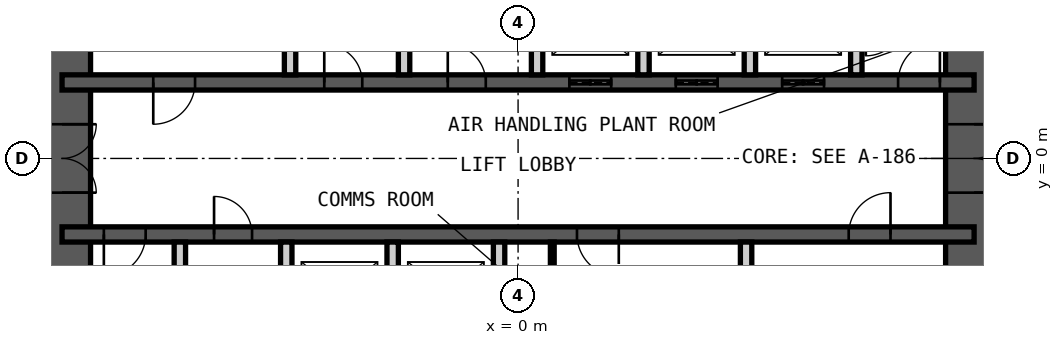
"""IFC4 building model, lengths in metres.
Left out: names, types, materials, properties, quantities, classifications, styles, units other than length and angle.
Written with IfcOpenShell. Run it as: python <this file> out.ifc"""

import sys

from ifc_helpers import new_model, si_unit, direction, frame, frame_2d, origin, place, context, subcontext, project, spatial, rectangle, extrude, element, fill, save


model = new_model("IFC4")
c1 = context("Model", 3, precision=1e-05, world=origin(), true_north=direction((0.0, 1.0)))
c2 = subcontext(c1, "Body", "Model", "MODEL_VIEW")
j1 = project(units=[si_unit("LENGTHUNIT", "METRE"), si_unit("PLANEANGLEUNIT", "RADIAN")], contexts=[c1])
p1 = place(None, origin())
s1 = spatial("IfcSite", under=j1, at=p1, CompositionType="ELEMENT")
p2 = place(p1, origin())
s2 = spatial("IfcBuilding", under=s1, at=p2, CompositionType="ELEMENT")
p3 = place(p2, frame((0.0, 0.0, 170.2)))
s3 = spatial("IfcBuildingStorey", under=s2, at=p3, CompositionType="ELEMENT", Elevation=170.2)
p4 = place(p3, frame((12.0, -9.0, 0.0), z_axis=(0.0, 0.0, 1.0), x_axis=(0.0, 1.0, 0.0)))
e1 = element("IfcWall", 1, at=p4, inside=s3, PredefinedType="SHEAR", context=c2, shape_type="SweptSolid", body=[
    extrude(rectangle(XDim=18.0, YDim=1.5, at=frame_2d((9.0, 0.0))), origin(), (0.0, 0.0, 1.0), 4.2),
])
p5 = place(p4, frame((8.1, 0.0, 0.0)))
e2 = element("IfcOpeningElement", 2, at=p5, cuts=e1, PredefinedType="OPENING", context=c2, shape_type="SweptSolid", body=[
    extrude(rectangle(XDim=1.8, YDim=2.1, at=frame_2d((0.9, 1.05))), frame((0.0, 0.76, 0.0), z_axis=(0.0, -1.0, 0.0), x_axis=(1.0, 0.0, 0.0)), (0.0, 0.0, 1.0), 1.52),
])
p6 = place(p3, frame((-12.0, -9.0, 0.0), z_axis=(0.0, 0.0, 1.0), x_axis=(0.0, 1.0, 0.0)))
e3 = element("IfcWall", 3, at=p6, inside=s3, PredefinedType="SHEAR", context=c2, shape_type="SweptSolid", body=[
    extrude(rectangle(XDim=18.0, YDim=1.5, at=frame_2d((9.0, 0.0))), origin(), (0.0, 0.0, 1.0), 4.2),
])
p7 = place(p6, frame((8.1, 0.0, 0.0)))
e4 = element("IfcOpeningElement", 4, at=p7, cuts=e3, PredefinedType="OPENING", context=c2, shape_type="SweptSolid", body=[
    extrude(rectangle(XDim=1.8, YDim=2.1, at=frame_2d((0.9, 1.05))), frame((0.0, 0.76, 0.0), z_axis=(0.0, -1.0, 0.0), x_axis=(1.0, 0.0, 0.0)), (0.0, 0.0, 1.0), 1.52),
])
p8 = place(p3, frame((-12.0, 2.0, 0.0), z_axis=(0.0, 0.0, 1.0), x_axis=(1.0, 0.0, 0.0)))
e5 = element("IfcWall", 5, at=p8, inside=s3, PredefinedType="SHEAR", context=c2, shape_type="SweptSolid", body=[
    extrude(rectangle(XDim=24.0, YDim=0.4, at=frame_2d((12.0, 0.0))), origin(), (0.0, 0.0, 1.0), 4.2),
])
p9 = place(p8, frame((2.4, 0.0, 0.0)))
e6 = element("IfcOpeningElement", 6, at=p9, cuts=e5, PredefinedType="OPENING", context=c2, shape_type="SweptSolid", body=[
    extrude(rectangle(XDim=1.1, YDim=2.1, at=frame_2d((0.55, 1.05))), frame((0.0, 0.21, 0.0), z_axis=(0.0, -1.0, 0.0), x_axis=(1.0, 0.0, 0.0)), (0.0, 0.0, 1.0), 0.42),
])
p10 = place(p8, frame((22.0, 0.0, 0.0)))
e7 = element("IfcOpeningElement", 7, at=p10, cuts=e5, PredefinedType="OPENING", context=c2, shape_type="SweptSolid", body=[
    extrude(rectangle(XDim=1.1, YDim=2.1, at=frame_2d((0.55, 1.05))), frame((0.0, 0.21, 0.0), z_axis=(0.0, -1.0, 0.0), x_axis=(1.0, 0.0, 0.0)), (0.0, 0.0, 1.0), 0.42),
])
p11 = place(p8, frame((10.15, 0.0, 0.0)))
e8 = element("IfcOpeningElement", 8, at=p11, cuts=e5, PredefinedType="OPENING", context=c2, shape_type="SweptSolid", body=[
    extrude(rectangle(XDim=1.0, YDim=2.1, at=frame_2d((0.5, 1.05))), frame((0.0, 0.21, 0.0), z_axis=(0.0, -1.0, 0.0), x_axis=(1.0, 0.0, 0.0)), (0.0, 0.0, 1.0), 0.42),
])
p12 = place(p8, frame((6.9, 0.0, 0.0)))
e9 = element("IfcOpeningElement", 9, at=p12, cuts=e5, PredefinedType="OPENING", context=c2, shape_type="SweptSolid", body=[
    extrude(rectangle(XDim=1.0, YDim=2.1, at=frame_2d((0.5, 1.05))), frame((0.0, 0.21, 0.0), z_axis=(0.0, -1.0, 0.0), x_axis=(1.0, 0.0, 0.0)), (0.0, 0.0, 1.0), 0.42),
])
p13 = place(p8, frame((13.35, 0.0, 0.0)))
e10 = element("IfcOpeningElement", 10, at=p13, cuts=e5, PredefinedType="OPENING", context=c2, shape_type="SweptSolid", body=[
    extrude(rectangle(XDim=1.1, YDim=2.4, at=frame_2d((0.55, 1.2))), frame((0.0, 0.21, 0.0), z_axis=(0.0, -1.0, 0.0), x_axis=(1.0, 0.0, 0.0)), (0.0, 0.0, 1.0), 0.42),
])
p14 = place(p8, frame((16.15, 0.0, 0.0)))
e11 = element("IfcOpeningElement", 11, at=p14, cuts=e5, PredefinedType="OPENING", context=c2, shape_type="SweptSolid", body=[
    extrude(rectangle(XDim=1.1, YDim=2.4, at=frame_2d((0.55, 1.2))), frame((0.0, 0.21, 0.0), z_axis=(0.0, -1.0, 0.0), x_axis=(1.0, 0.0, 0.0)), (0.0, 0.0, 1.0), 0.42),
])
p15 = place(p8, frame((18.95, 0.0, 0.0)))
e12 = element("IfcOpeningElement", 12, at=p15, cuts=e5, PredefinedType="OPENING", context=c2, shape_type="SweptSolid", body=[
    extrude(rectangle(XDim=1.1, YDim=2.4, at=frame_2d((0.55, 1.2))), frame((0.0, 0.21, 0.0), z_axis=(0.0, -1.0, 0.0), x_axis=(1.0, 0.0, 0.0)), (0.0, 0.0, 1.0), 0.42),
])
p16 = place(p3, frame((-12.0, -2.0, 0.0), z_axis=(0.0, 0.0, 1.0), x_axis=(1.0, 0.0, 0.0)))
e13 = element("IfcWall", 13, at=p16, inside=s3, PredefinedType="SHEAR", context=c2, shape_type="SweptSolid", body=[
    extrude(rectangle(XDim=24.0, YDim=0.4, at=frame_2d((12.0, 0.0))), origin(), (0.0, 0.0, 1.0), 4.2),
])
p17 = place(p16, frame((1.1, 0.0, 0.0)))
e14 = element("IfcOpeningElement", 14, at=p17, cuts=e13, PredefinedType="OPENING", context=c2, shape_type="SweptSolid", body=[
    extrude(rectangle(XDim=1.1, YDim=2.1, at=frame_2d((0.55, 1.05))), frame((0.0, 0.21, 0.0), z_axis=(0.0, -1.0, 0.0), x_axis=(1.0, 0.0, 0.0)), (0.0, 0.0, 1.0), 0.42),
])
p18 = place(p16, frame((13.55, 0.0, 0.0)))
e15 = element("IfcOpeningElement", 15, at=p18, cuts=e13, PredefinedType="OPENING", context=c2, shape_type="SweptSolid", body=[
    extrude(rectangle(XDim=1.1, YDim=2.1, at=frame_2d((0.55, 1.05))), frame((0.0, 0.21, 0.0), z_axis=(0.0, -1.0, 0.0), x_axis=(1.0, 0.0, 0.0)), (0.0, 0.0, 1.0), 0.42),
])
p19 = place(p16, frame((20.7, 0.0, 0.0)))
e16 = element("IfcOpeningElement", 16, at=p19, cuts=e13, PredefinedType="OPENING", context=c2, shape_type="SweptSolid", body=[
    extrude(rectangle(XDim=1.1, YDim=2.1, at=frame_2d((0.55, 1.05))), frame((0.0, 0.21, 0.0), z_axis=(0.0, -1.0, 0.0), x_axis=(1.0, 0.0, 0.0)), (0.0, 0.0, 1.0), 0.42),
])
p20 = place(p16, frame((4.0, 0.0, 0.0)))
e17 = element("IfcOpeningElement", 17, at=p20, cuts=e13, PredefinedType="OPENING", context=c2, shape_type="SweptSolid", body=[
    extrude(rectangle(XDim=1.0, YDim=2.1, at=frame_2d((0.5, 1.05))), frame((0.0, 0.21, 0.0), z_axis=(0.0, -1.0, 0.0), x_axis=(1.0, 0.0, 0.0)), (0.0, 0.0, 1.0), 0.42),
])
for number, where, z_axis, x_axis in (
    (18, (-6.0, 2.2, 0.0), (0.0, 0.0, 1.0), (0.0, 1.0, 0.0)),
    (19, (-3.0, 2.2, 0.0), (0.0, 0.0, 1.0), (0.0, 1.0, 0.0)),
    (20, (0.5, 2.2, 0.0), (0.0, 0.0, 1.0), (0.0, 1.0, 0.0)),
    (21, (3.3, 2.2, 0.0), (0.0, 0.0, 1.0), (0.0, 1.0, 0.0)),
    (22, (6.1, 2.2, 0.0), (0.0, 0.0, 1.0), (0.0, 1.0, 0.0)),
    (23, (8.9, 2.2, 0.0), (0.0, 0.0, 1.0), (0.0, 1.0, 0.0)),
    (24, (-8.9, -4.85, 0.0), (0.0, 0.0, 1.0), (0.0, 1.0, 0.0)),
    (25, (-6.1, -4.85, 0.0), (0.0, 0.0, 1.0), (0.0, 1.0, 0.0)),
    (26, (-3.3, -4.85, 0.0), (0.0, 0.0, 1.0), (0.0, 1.0, 0.0)),
    (27, (-0.5, -4.85, 0.0), (0.0, 0.0, 1.0), (0.0, 1.0, 0.0)),
    (28, (6.0, -4.85, 0.0), (0.0, 0.0, 1.0), (0.0, 1.0, 0.0)),
):
    element("IfcWall", number, at=place(p3, frame(where, z_axis=z_axis, x_axis=x_axis)), inside=s3, PredefinedType="PARTITIONING", context=c2, shape_type="SweptSolid", body=[
        extrude(rectangle(XDim=2.65, YDim=0.3, at=frame_2d((1.325, 0.0))), origin(), (0.0, 0.0, 1.0), 3.98),
    ])
p21 = place(p3, frame((0.9, -4.85, 0.0), z_axis=(0.0, 0.0, 1.0), x_axis=(0.0, 1.0, 0.0)))
e29 = element("IfcWall", 29, at=p21, inside=s3, PredefinedType="PARTITIONING", context=c2, shape_type="SweptSolid", body=[
    extrude(rectangle(XDim=2.65, YDim=0.1, at=frame_2d((1.325, 0.0))), origin(), (0.0, 0.0, 1.0), 3.98),
])
p22 = place(p21, frame((0.1, 0.0, 0.0)))
e30 = element("IfcOpeningElement", 30, at=p22, cuts=e29, PredefinedType="OPENING", context=c2, shape_type="SweptSolid", body=[
    extrude(rectangle(XDim=1.0, YDim=2.4, at=frame_2d((0.5, 1.2))), frame((0.0, 0.06, 0.0), z_axis=(0.0, -1.0, 0.0), x_axis=(1.0, 0.0, 0.0)), (0.0, 0.0, 1.0), 0.12),
])
p23 = place(p9, origin())
e31 = element("IfcDoor", 31, at=p23, inside=s3, OperationType="SINGLE_SWING_LEFT", PredefinedType="DOOR", context=c2, shape_type="SweptSolid", body=[
    extrude(rectangle(XDim=1.1, YDim=2.1, at=frame_2d((0.55, 1.05))), frame((0.0, 0.025, 0.0), z_axis=(0.0, -1.0, 0.0), x_axis=(1.0, 0.0, 0.0)), (0.0, 0.0, 1.0), 0.05),
])
fill(e6, e31)
p24 = place(p17, origin())
e32 = element("IfcDoor", 32, at=p24, inside=s3, OperationType="SINGLE_SWING_LEFT", PredefinedType="DOOR", context=c2, shape_type="SweptSolid", body=[
    extrude(rectangle(XDim=1.1, YDim=2.1, at=frame_2d((0.55, 1.05))), frame((0.0, 0.025, 0.0), z_axis=(0.0, -1.0, 0.0), x_axis=(1.0, 0.0, 0.0)), (0.0, 0.0, 1.0), 0.05),
])
fill(e14, e32)
p25 = place(p10, origin())
e33 = element("IfcDoor", 33, at=p25, inside=s3, OperationType="SINGLE_SWING_LEFT", PredefinedType="DOOR", context=c2, shape_type="SweptSolid", body=[
    extrude(rectangle(XDim=1.1, YDim=2.1, at=frame_2d((0.55, 1.05))), frame((0.0, 0.025, 0.0), z_axis=(0.0, -1.0, 0.0), x_axis=(1.0, 0.0, 0.0)), (0.0, 0.0, 1.0), 0.05),
])
fill(e7, e33)
p26 = place(p11, origin())
e34 = element("IfcDoor", 34, at=p26, inside=s3, OperationType="SINGLE_SWING_RIGHT", PredefinedType="DOOR", context=c2, shape_type="SweptSolid", body=[
    extrude(rectangle(XDim=1.0, YDim=2.1, at=frame_2d((0.5, 1.05))), frame((0.0, 0.025, 0.0), z_axis=(0.0, -1.0, 0.0), x_axis=(1.0, 0.0, 0.0)), (0.0, 0.0, 1.0), 0.05),
])
fill(e8, e34)
p27 = place(p18, origin())
e35 = element("IfcDoor", 35, at=p27, inside=s3, OperationType="SINGLE_SWING_RIGHT", PredefinedType="DOOR", context=c2, shape_type="SweptSolid", body=[
    extrude(rectangle(XDim=1.1, YDim=2.1, at=frame_2d((0.55, 1.05))), frame((0.0, 0.025, 0.0), z_axis=(0.0, -1.0, 0.0), x_axis=(1.0, 0.0, 0.0)), (0.0, 0.0, 1.0), 0.05),
])
fill(e15, e35)
p28 = place(p19, origin())
e36 = element("IfcDoor", 36, at=p28, inside=s3, OperationType="SINGLE_SWING_LEFT", PredefinedType="DOOR", context=c2, shape_type="SweptSolid", body=[
    extrude(rectangle(XDim=1.1, YDim=2.1, at=frame_2d((0.55, 1.05))), frame((0.0, 0.025, 0.0), z_axis=(0.0, -1.0, 0.0), x_axis=(1.0, 0.0, 0.0)), (0.0, 0.0, 1.0), 0.05),
])
fill(e16, e36)
p29 = place(p5, origin())
e37 = element("IfcDoor", 37, at=p29, inside=s3, OperationType="DOUBLE_DOOR_DOUBLE_SWING", PredefinedType="DOOR", context=c2, shape_type="SweptSolid", body=[
    extrude(rectangle(XDim=1.8, YDim=2.1, at=frame_2d((0.9, 1.05))), frame((0.0, 0.025, 0.0), z_axis=(0.0, -1.0, 0.0), x_axis=(1.0, 0.0, 0.0)), (0.0, 0.0, 1.0), 0.05),
])
fill(e2, e37)
p30 = place(p7, origin())
e38 = element("IfcDoor", 38, at=p30, inside=s3, OperationType="DOUBLE_DOOR_DOUBLE_SWING", PredefinedType="DOOR", context=c2, shape_type="SweptSolid", body=[
    extrude(rectangle(XDim=1.8, YDim=2.1, at=frame_2d((0.9, 1.05))), frame((0.0, 0.025, 0.0), z_axis=(0.0, -1.0, 0.0), x_axis=(1.0, 0.0, 0.0)), (0.0, 0.0, 1.0), 0.05),
])
fill(e4, e38)
p31 = place(p12, origin())
e39 = element("IfcDoor", 39, at=p31, inside=s3, OperationType="SINGLE_SWING_RIGHT", PredefinedType="DOOR", context=c2, shape_type="SweptSolid", body=[
    extrude(rectangle(XDim=1.0, YDim=2.1, at=frame_2d((0.5, 1.05))), frame((0.0, 0.025, 0.0), z_axis=(0.0, -1.0, 0.0), x_axis=(1.0, 0.0, 0.0)), (0.0, 0.0, 1.0), 0.05),
])
fill(e9, e39)
p32 = place(p13, origin())
e40 = element("IfcDoor", 40, at=p32, inside=s3, OperationType="DOUBLE_DOOR_SLIDING", PredefinedType="DOOR", context=c2, shape_type="SweptSolid", body=[
    extrude(rectangle(XDim=1.1, YDim=2.4, at=frame_2d((0.55, 1.2))), frame((0.0, 0.025, 0.0), z_axis=(0.0, -1.0, 0.0), x_axis=(1.0, 0.0, 0.0)), (0.0, 0.0, 1.0), 0.05),
])
fill(e10, e40)
p33 = place(p14, origin())
e41 = element("IfcDoor", 41, at=p33, inside=s3, OperationType="DOUBLE_DOOR_SLIDING", PredefinedType="DOOR", context=c2, shape_type="SweptSolid", body=[
    extrude(rectangle(XDim=1.1, YDim=2.4, at=frame_2d((0.55, 1.2))), frame((0.0, 0.025, 0.0), z_axis=(0.0, -1.0, 0.0), x_axis=(1.0, 0.0, 0.0)), (0.0, 0.0, 1.0), 0.05),
])
fill(e11, e41)
p34 = place(p15, origin())
e42 = element("IfcDoor", 42, at=p34, inside=s3, OperationType="DOUBLE_DOOR_SLIDING", PredefinedType="DOOR", context=c2, shape_type="SweptSolid", body=[
    extrude(rectangle(XDim=1.1, YDim=2.4, at=frame_2d((0.55, 1.2))), frame((0.0, 0.025, 0.0), z_axis=(0.0, -1.0, 0.0), x_axis=(1.0, 0.0, 0.0)), (0.0, 0.0, 1.0), 0.05),
])
fill(e12, e42)
p35 = place(p20, origin())
e43 = element("IfcDoor", 43, at=p35, inside=s3, OperationType="SINGLE_SWING_RIGHT", PredefinedType="DOOR", context=c2, shape_type="SweptSolid", body=[
    extrude(rectangle(XDim=1.0, YDim=2.1, at=frame_2d((0.5, 1.05))), frame((0.0, 0.025, 0.0), z_axis=(0.0, -1.0, 0.0), x_axis=(1.0, 0.0, 0.0)), (0.0, 0.0, 1.0), 0.05),
])
fill(e17, e43)
save(model, sys.argv[1])
